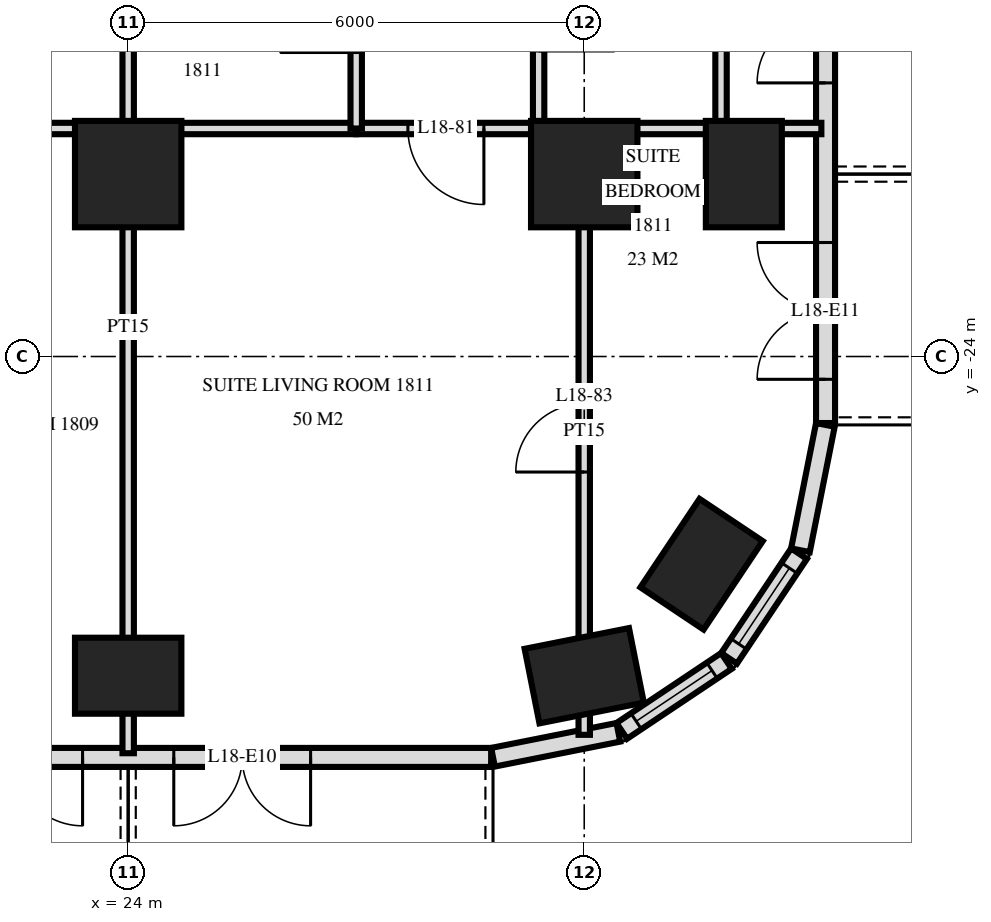
"""IFC4 building model, lengths in metres.
Left out: names, types, materials, properties, quantities, classifications, styles, units other than length and angle.
Written with IfcOpenShell. Run it as: python <this file> out.ifc"""

import sys

from ifc_helpers import new_model, si_unit, direction, frame, frame_2d, origin, origin_2d, place, context, subcontext, project, spatial, rectangle, extrude, element, fill, save


model = new_model("IFC4")
c1 = context("Model", 3, precision=1e-05, world=origin(), true_north=direction((0.0, 1.0)))
c2 = subcontext(c1, "Body", "Model", "MODEL_VIEW")
j1 = project(units=[si_unit("LENGTHUNIT", "METRE"), si_unit("PLANEANGLEUNIT", "RADIAN")], contexts=[c1])
p1 = place(None, origin())
s1 = spatial("IfcSite", under=j1, at=p1, CompositionType="ELEMENT")
p2 = place(p1, origin())
s2 = spatial("IfcBuilding", under=s1, at=p2, CompositionType="ELEMENT")
p3 = place(p2, frame((0.0, 0.0, 74.4)))
s3 = spatial("IfcBuildingStorey", under=s2, at=p3, CompositionType="ELEMENT", Elevation=74.4)
p4 = place(p3, frame((24.0, -28.2, 0.0), z_axis=(0.0, 0.0, 1.0), x_axis=(1.0, 0.0, 0.0)))
e1 = element("IfcColumn", 1, at=p4, inside=s3, PredefinedType="COLUMN", context=c2, shape_type="SweptSolid", body=[
    extrude(rectangle(XDim=1.4, YDim=1.0, at=origin_2d()), origin(), (0.0, 0.0, 1.0), 3.6),
])
p5 = place(p3, frame((24.0, -21.6, 0.0), z_axis=(0.0, 0.0, 1.0), x_axis=(1.0, 0.0, 0.0)))
e2 = element("IfcColumn", 2, at=p5, inside=s3, PredefinedType="COLUMN", context=c2, shape_type="SweptSolid", body=[
    extrude(rectangle(XDim=1.4, YDim=1.4, at=origin_2d()), origin(), (0.0, 0.0, 1.0), 3.6),
])
p6 = place(p3, frame((30.0, -28.2, 0.0), z_axis=(0.0, 0.0, 1.0), x_axis=(0.980792089743, 0.195056086032, 0.0)))
e3 = element("IfcColumn", 3, at=p6, inside=s3, PredefinedType="COLUMN", context=c2, shape_type="SweptSolid", body=[
    extrude(rectangle(XDim=1.4, YDim=1.0, at=origin_2d()), origin(), (0.0, 0.0, 1.0), 3.6),
])
p7 = place(p3, frame((30.0, -21.6, 0.0), z_axis=(0.0, 0.0, 1.0), x_axis=(1.0, 0.0, 0.0)))
e4 = element("IfcColumn", 4, at=p7, inside=s3, PredefinedType="COLUMN", context=c2, shape_type="SweptSolid", body=[
    extrude(rectangle(XDim=1.4, YDim=1.4, at=origin_2d()), origin(), (0.0, 0.0, 1.0), 3.6),
])
for number, where, z_axis, x_axis in (
    (5, (31.544, -26.733, 0.0), (0.0, 0.0, 1.0), (0.556, 0.831, 0.0)),
    (6, (32.1, -21.6, 0.0), (0.0, 0.0, 1.0), (0.0, 1.0, 0.0)),
):
    element("IfcColumn", number, at=place(p3, frame(where, z_axis=z_axis, x_axis=x_axis)), inside=s3, PredefinedType="COLUMN", context=c2, shape_type="SweptSolid", body=[
        extrude(rectangle(XDim=1.4, YDim=1.0, at=origin_2d()), origin(), (0.0, 0.0, 1.0), 3.6),
    ])
p8 = place(p3, frame((-28.775, -29.275, 0.0), z_axis=(0.0, 0.0, 1.0), x_axis=(1.0, 0.0, 0.0)))
e7 = element("IfcWall", 7, at=p8, inside=s3, PredefinedType="SOLIDWALL", context=c2, shape_type="SweptSolid", body=[
    extrude(rectangle(XDim=57.551, YDim=0.25, at=frame_2d((28.775, 0.0))), origin(), (0.0, 0.0, 1.0), 3.32),
])
p9 = place(p8, frame((0.575, 0.0, 0.0)))
e8 = element("IfcOpeningElement", 8, at=p9, cuts=e7, PredefinedType="OPENING", context=c2, shape_type="SweptSolid", body=[
    extrude(rectangle(XDim=1.8, YDim=2.4, at=frame_2d((0.9, 1.2))), frame((0.0, 0.135, 0.0), z_axis=(0.0, -1.0, 0.0), x_axis=(1.0, 0.0, 0.0)), (0.0, 0.0, 1.0), 0.27),
])
p10 = place(p8, frame((5.075, 0.0, 0.3)))
e9 = element("IfcOpeningElement", 9, at=p10, cuts=e7, PredefinedType="OPENING", context=c2, shape_type="SweptSolid", body=[
    extrude(rectangle(XDim=2.4, YDim=2.1, at=frame_2d((1.2, 1.05))), frame((0.0, 0.135, 0.0), z_axis=(0.0, -1.0, 0.0), x_axis=(1.0, 0.0, 0.0)), (0.0, 0.0, 1.0), 0.27),
])
p11 = place(p8, frame((8.375, 0.0, 0.0)))
e10 = element("IfcOpeningElement", 10, at=p11, cuts=e7, PredefinedType="OPENING", context=c2, shape_type="SweptSolid", body=[
    extrude(rectangle(XDim=1.8, YDim=2.4, at=frame_2d((0.9, 1.2))), frame((0.0, 0.135, 0.0), z_axis=(0.0, -1.0, 0.0), x_axis=(1.0, 0.0, 0.0)), (0.0, 0.0, 1.0), 0.27),
])
p12 = place(p8, frame((11.375, 0.0, 0.0)))
e11 = element("IfcOpeningElement", 11, at=p12, cuts=e7, PredefinedType="OPENING", context=c2, shape_type="SweptSolid", body=[
    extrude(rectangle(XDim=1.8, YDim=2.4, at=frame_2d((0.9, 1.2))), frame((0.0, 0.135, 0.0), z_axis=(0.0, -1.0, 0.0), x_axis=(1.0, 0.0, 0.0)), (0.0, 0.0, 1.0), 0.27),
])
p13 = place(p8, frame((14.075, 0.0, 0.3)))
e12 = element("IfcOpeningElement", 12, at=p13, cuts=e7, PredefinedType="OPENING", context=c2, shape_type="SweptSolid", body=[
    extrude(rectangle(XDim=2.4, YDim=2.1, at=frame_2d((1.2, 1.05))), frame((0.0, 0.135, 0.0), z_axis=(0.0, -1.0, 0.0), x_axis=(1.0, 0.0, 0.0)), (0.0, 0.0, 1.0), 0.27),
])
p14 = place(p8, frame((17.375, 0.0, 0.0)))
e13 = element("IfcOpeningElement", 13, at=p14, cuts=e7, PredefinedType="OPENING", context=c2, shape_type="SweptSolid", body=[
    extrude(rectangle(XDim=1.8, YDim=2.4, at=frame_2d((0.9, 1.2))), frame((0.0, 0.135, 0.0), z_axis=(0.0, -1.0, 0.0), x_axis=(1.0, 0.0, 0.0)), (0.0, 0.0, 1.0), 0.27),
])
p15 = place(p8, frame((20.075, 0.0, 0.3)))
e14 = element("IfcOpeningElement", 14, at=p15, cuts=e7, PredefinedType="OPENING", context=c2, shape_type="SweptSolid", body=[
    extrude(rectangle(XDim=2.4, YDim=2.1, at=frame_2d((1.2, 1.05))), frame((0.0, 0.135, 0.0), z_axis=(0.0, -1.0, 0.0), x_axis=(1.0, 0.0, 0.0)), (0.0, 0.0, 1.0), 0.27),
])
p16 = place(p8, frame((23.075, 0.0, 0.3)))
e15 = element("IfcOpeningElement", 15, at=p16, cuts=e7, PredefinedType="OPENING", context=c2, shape_type="SweptSolid", body=[
    extrude(rectangle(XDim=2.4, YDim=2.1, at=frame_2d((1.2, 1.05))), frame((0.0, 0.135, 0.0), z_axis=(0.0, -1.0, 0.0), x_axis=(1.0, 0.0, 0.0)), (0.0, 0.0, 1.0), 0.27),
])
p17 = place(p8, frame((26.375, 0.0, 0.0)))
e16 = element("IfcOpeningElement", 16, at=p17, cuts=e7, PredefinedType="OPENING", context=c2, shape_type="SweptSolid", body=[
    extrude(rectangle(XDim=1.8, YDim=2.4, at=frame_2d((0.9, 1.2))), frame((0.0, 0.135, 0.0), z_axis=(0.0, -1.0, 0.0), x_axis=(1.0, 0.0, 0.0)), (0.0, 0.0, 1.0), 0.27),
])
p18 = place(p8, frame((29.375, 0.0, 0.0)))
e17 = element("IfcOpeningElement", 17, at=p18, cuts=e7, PredefinedType="OPENING", context=c2, shape_type="SweptSolid", body=[
    extrude(rectangle(XDim=1.8, YDim=2.4, at=frame_2d((0.9, 1.2))), frame((0.0, 0.135, 0.0), z_axis=(0.0, -1.0, 0.0), x_axis=(1.0, 0.0, 0.0)), (0.0, 0.0, 1.0), 0.27),
])
p19 = place(p8, frame((32.075, 0.0, 0.3)))
e18 = element("IfcOpeningElement", 18, at=p19, cuts=e7, PredefinedType="OPENING", context=c2, shape_type="SweptSolid", body=[
    extrude(rectangle(XDim=2.4, YDim=2.1, at=frame_2d((1.2, 1.05))), frame((0.0, 0.135, 0.0), z_axis=(0.0, -1.0, 0.0), x_axis=(1.0, 0.0, 0.0)), (0.0, 0.0, 1.0), 0.27),
])
p20 = place(p8, frame((35.375, 0.0, 0.0)))
e19 = element("IfcOpeningElement", 19, at=p20, cuts=e7, PredefinedType="OPENING", context=c2, shape_type="SweptSolid", body=[
    extrude(rectangle(XDim=1.8, YDim=2.4, at=frame_2d((0.9, 1.2))), frame((0.0, 0.135, 0.0), z_axis=(0.0, -1.0, 0.0), x_axis=(1.0, 0.0, 0.0)), (0.0, 0.0, 1.0), 0.27),
])
p21 = place(p8, frame((38.075, 0.0, 0.3)))
e20 = element("IfcOpeningElement", 20, at=p21, cuts=e7, PredefinedType="OPENING", context=c2, shape_type="SweptSolid", body=[
    extrude(rectangle(XDim=2.4, YDim=2.1, at=frame_2d((1.2, 1.05))), frame((0.0, 0.135, 0.0), z_axis=(0.0, -1.0, 0.0), x_axis=(1.0, 0.0, 0.0)), (0.0, 0.0, 1.0), 0.27),
])
p22 = place(p8, frame((41.075, 0.0, 0.3)))
e21 = element("IfcOpeningElement", 21, at=p22, cuts=e7, PredefinedType="OPENING", context=c2, shape_type="SweptSolid", body=[
    extrude(rectangle(XDim=2.4, YDim=2.1, at=frame_2d((1.2, 1.05))), frame((0.0, 0.135, 0.0), z_axis=(0.0, -1.0, 0.0), x_axis=(1.0, 0.0, 0.0)), (0.0, 0.0, 1.0), 0.27),
])
p23 = place(p8, frame((44.375, 0.0, 0.0)))
e22 = element("IfcOpeningElement", 22, at=p23, cuts=e7, PredefinedType="OPENING", context=c2, shape_type="SweptSolid", body=[
    extrude(rectangle(XDim=1.8, YDim=2.4, at=frame_2d((0.9, 1.2))), frame((0.0, 0.135, 0.0), z_axis=(0.0, -1.0, 0.0), x_axis=(1.0, 0.0, 0.0)), (0.0, 0.0, 1.0), 0.27),
])
p24 = place(p8, frame((47.075, 0.0, 0.3)))
e23 = element("IfcOpeningElement", 23, at=p24, cuts=e7, PredefinedType="OPENING", context=c2, shape_type="SweptSolid", body=[
    extrude(rectangle(XDim=2.4, YDim=2.1, at=frame_2d((1.2, 1.05))), frame((0.0, 0.135, 0.0), z_axis=(0.0, -1.0, 0.0), x_axis=(1.0, 0.0, 0.0)), (0.0, 0.0, 1.0), 0.27),
])
p25 = place(p8, frame((50.375, 0.0, 0.0)))
e24 = element("IfcOpeningElement", 24, at=p25, cuts=e7, PredefinedType="OPENING", context=c2, shape_type="SweptSolid", body=[
    extrude(rectangle(XDim=1.8, YDim=2.4, at=frame_2d((0.9, 1.2))), frame((0.0, 0.135, 0.0), z_axis=(0.0, -1.0, 0.0), x_axis=(1.0, 0.0, 0.0)), (0.0, 0.0, 1.0), 0.27),
])
p26 = place(p8, frame((53.375, 0.0, 0.0)))
e25 = element("IfcOpeningElement", 25, at=p26, cuts=e7, PredefinedType="OPENING", context=c2, shape_type="SweptSolid", body=[
    extrude(rectangle(XDim=1.8, YDim=2.4, at=frame_2d((0.9, 1.2))), frame((0.0, 0.135, 0.0), z_axis=(0.0, -1.0, 0.0), x_axis=(1.0, 0.0, 0.0)), (0.0, 0.0, 1.0), 0.27),
])
p27 = place(p3, frame((28.8, -29.273, 0.0), z_axis=(0.0, 0.0, 1.0), x_axis=(0.980775640221, 0.19513878023, 0.0)))
e26 = element("IfcWall", 26, at=p27, inside=s3, PredefinedType="SOLIDWALL", context=c2, shape_type="SweptSolid", body=[
    extrude(rectangle(XDim=1.681, YDim=0.25, at=frame_2d((0.841, 0.0))), origin(), (0.0, 0.0, 1.0), 3.32),
])
p28 = place(p3, frame((30.494, -28.926, 0.0), z_axis=(0.0, 0.0, 1.0), x_axis=(0.831482937015, 0.55555029066, 0.0)))
e27 = element("IfcWall", 27, at=p28, inside=s3, PredefinedType="SOLIDWALL", context=c2, shape_type="SweptSolid", body=[
    extrude(rectangle(XDim=1.656, YDim=0.25, at=frame_2d((0.828, 0.0))), origin(), (0.0, 0.0, 1.0), 3.32),
])
p29 = place(p28, frame((0.228, 0.0, 0.9)))
e28 = element("IfcOpeningElement", 28, at=p29, cuts=e27, PredefinedType="OPENING", context=c2, shape_type="SweptSolid", body=[
    extrude(rectangle(XDim=1.2, YDim=1.5, at=frame_2d((0.6, 0.75))), frame((0.0, 0.135, 0.0), z_axis=(0.0, -1.0, 0.0), x_axis=(1.0, 0.0, 0.0)), (0.0, 0.0, 1.0), 0.27),
])
p30 = place(p3, frame((31.906, -27.971, 0.0), z_axis=(0.0, 0.0, 1.0), x_axis=(0.55555029066, 0.831482937015, 0.0)))
e29 = element("IfcWall", 29, at=p30, inside=s3, PredefinedType="SOLIDWALL", context=c2, shape_type="SweptSolid", body=[
    extrude(rectangle(XDim=1.656, YDim=0.25, at=frame_2d((0.828, 0.0))), origin(), (0.0, 0.0, 1.0), 3.32),
])
p31 = place(p30, frame((0.228, 0.0, 0.9)))
e30 = element("IfcOpeningElement", 30, at=p31, cuts=e29, PredefinedType="OPENING", context=c2, shape_type="SweptSolid", body=[
    extrude(rectangle(XDim=1.2, YDim=1.5, at=frame_2d((0.6, 0.75))), frame((0.0, 0.135, 0.0), z_axis=(0.0, -1.0, 0.0), x_axis=(1.0, 0.0, 0.0)), (0.0, 0.0, 1.0), 0.27),
])
p32 = place(p3, frame((32.844, -26.549, 0.0), z_axis=(0.0, 0.0, 1.0), x_axis=(0.195166572128, 0.980770110232, 0.0)))
e31 = element("IfcWall", 31, at=p32, inside=s3, PredefinedType="SOLIDWALL", context=c2, shape_type="SweptSolid", body=[
    extrude(rectangle(XDim=1.681, YDim=0.25, at=frame_2d((0.841, 0.0))), origin(), (0.0, 0.0, 1.0), 3.32),
])
p33 = place(p3, frame((33.175, -24.875, 0.0), z_axis=(0.0, 0.0, 1.0), x_axis=(0.0, 1.0, 0.0)))
e32 = element("IfcWall", 32, at=p33, inside=s3, PredefinedType="SOLIDWALL", context=c2, shape_type="SweptSolid", body=[
    extrude(rectangle(XDim=21.551, YDim=0.25, at=frame_2d((10.775, 0.0))), origin(), (0.0, 0.0, 1.0), 3.32),
])
p34 = place(p33, frame((0.575, 0.0, 0.0)))
e33 = element("IfcOpeningElement", 33, at=p34, cuts=e32, PredefinedType="OPENING", context=c2, shape_type="SweptSolid", body=[
    extrude(rectangle(XDim=1.8, YDim=2.4, at=frame_2d((0.9, 1.2))), frame((0.0, 0.135, 0.0), z_axis=(0.0, -1.0, 0.0), x_axis=(1.0, 0.0, 0.0)), (0.0, 0.0, 1.0), 0.27),
])
p35 = place(p33, frame((4.475, 0.0, 0.0)))
e34 = element("IfcOpeningElement", 34, at=p35, cuts=e32, PredefinedType="OPENING", context=c2, shape_type="SweptSolid", body=[
    extrude(rectangle(XDim=1.8, YDim=2.4, at=frame_2d((0.9, 1.2))), frame((0.0, 0.135, 0.0), z_axis=(0.0, -1.0, 0.0), x_axis=(1.0, 0.0, 0.0)), (0.0, 0.0, 1.0), 0.27),
])
p36 = place(p33, frame((7.775, 0.0, 0.3)))
e35 = element("IfcOpeningElement", 35, at=p36, cuts=e32, PredefinedType="OPENING", context=c2, shape_type="SweptSolid", body=[
    extrude(rectangle(XDim=1.2, YDim=2.1, at=frame_2d((0.6, 1.05))), frame((0.0, 0.135, 0.0), z_axis=(0.0, -1.0, 0.0), x_axis=(1.0, 0.0, 0.0)), (0.0, 0.0, 1.0), 0.27),
])
p37 = place(p33, frame((13.1, 0.0, 0.0)))
e36 = element("IfcOpeningElement", 36, at=p37, cuts=e32, PredefinedType="OPENING", context=c2, shape_type="SweptSolid", body=[
    extrude(rectangle(XDim=1.8, YDim=2.4, at=frame_2d((0.9, 1.2))), frame((0.0, 0.135, 0.0), z_axis=(0.0, -1.0, 0.0), x_axis=(1.0, 0.0, 0.0)), (0.0, 0.0, 1.0), 0.27),
])
p38 = place(p3, frame((31.8, -21.0, 0.0), z_axis=(0.0, 0.0, 1.0), x_axis=(0.0, 1.0, 0.0)))
e37 = element("IfcWall", 37, at=p38, inside=s3, PredefinedType="PLUMBINGWALL", context=c2, shape_type="SweptSolid", body=[
    extrude(rectangle(XDim=3.0, YDim=0.15, at=frame_2d((1.5, 0.0))), origin(), (0.0, 0.0, 1.0), 3.32),
])
p39 = place(p38, frame((1.12, 0.0, 0.0)))
e38 = element("IfcOpeningElement", 38, at=p39, cuts=e37, PredefinedType="OPENING", context=c2, shape_type="SweptSolid", body=[
    extrude(rectangle(XDim=0.8, YDim=2.1, at=frame_2d((0.4, 1.05))), frame((0.0, 0.085, 0.0), z_axis=(0.0, -1.0, 0.0), x_axis=(1.0, 0.0, 0.0)), (0.0, 0.0, 1.0), 0.17),
])
p40 = place(p3, frame((30.0, -28.978, 0.0), z_axis=(0.0, 0.0, 1.0), x_axis=(0.0, 1.0, 0.0)))
e39 = element("IfcWall", 39, at=p40, inside=s3, PredefinedType="PARTITIONING", context=c2, shape_type="SweptSolid", body=[
    extrude(rectangle(XDim=7.978, YDim=0.15, at=frame_2d((3.989, 0.0))), origin(), (0.0, 0.0, 1.0), 3.32),
])
p41 = place(p40, frame((3.458, 0.0, 0.0)))
e40 = element("IfcOpeningElement", 40, at=p41, cuts=e39, PredefinedType="OPENING", context=c2, shape_type="SweptSolid", body=[
    extrude(rectangle(XDim=0.9, YDim=2.1, at=frame_2d((0.45, 1.05))), frame((0.0, 0.085, 0.0), z_axis=(0.0, -1.0, 0.0), x_axis=(1.0, 0.0, 0.0)), (0.0, 0.0, 1.0), 0.17),
])
p42 = place(p3, frame((29.4, -21.0, 0.0), z_axis=(0.0, 0.0, 1.0), x_axis=(0.0, 1.0, 0.0)))
e41 = element("IfcWall", 41, at=p42, inside=s3, PredefinedType="PARTITIONING", context=c2, shape_type="SweptSolid", body=[
    extrude(rectangle(XDim=3.0, YDim=0.15, at=frame_2d((1.5, 0.0))), origin(), (0.0, 0.0, 1.0), 3.32),
])
p43 = place(p42, frame((1.02, 0.0, 0.0)))
e42 = element("IfcOpeningElement", 42, at=p43, cuts=e41, PredefinedType="OPENING", context=c2, shape_type="SweptSolid", body=[
    extrude(rectangle(XDim=1.0, YDim=2.1, at=frame_2d((0.5, 1.05))), frame((0.0, 0.085, 0.0), z_axis=(0.0, -1.0, 0.0), x_axis=(1.0, 0.0, 0.0)), (0.0, 0.0, 1.0), 0.17),
])
p44 = place(p3, frame((27.0, -21.0, 0.0), z_axis=(0.0, 0.0, 1.0), x_axis=(0.0, 1.0, 0.0)))
e43 = element("IfcWall", 43, at=p44, inside=s3, PredefinedType="PARTITIONING", context=c2, shape_type="SweptSolid", body=[
    extrude(rectangle(XDim=3.0, YDim=0.15, at=frame_2d((1.5, 0.0))), origin(), (0.0, 0.0, 1.0), 3.32),
])
p45 = place(p44, frame((1.0, 0.0, 0.0)))
e44 = element("IfcOpeningElement", 44, at=p45, cuts=e43, PredefinedType="OPENING", context=c2, shape_type="SweptSolid", body=[
    extrude(rectangle(XDim=1.0, YDim=2.1, at=frame_2d((0.5, 1.05))), frame((0.0, 0.085, 0.0), z_axis=(0.0, -1.0, 0.0), x_axis=(1.0, 0.0, 0.0)), (0.0, 0.0, 1.0), 0.17),
])
p46 = place(p3, frame((24.0, -29.22, 0.0), z_axis=(0.0, 0.0, 1.0), x_axis=(0.0, 1.0, 0.0)))
e45 = element("IfcWall", 45, at=p46, inside=s3, PredefinedType="PARTITIONING", context=c2, shape_type="SweptSolid", body=[
    extrude(rectangle(XDim=11.22, YDim=0.15, at=frame_2d((5.61, 0.0))), origin(), (0.0, 0.0, 1.0), 3.32),
])
p47 = place(p3, frame((27.0, -21.0, 0.0), z_axis=(0.0, 0.0, 1.0), x_axis=(1.0, 0.0, 0.0)))
e46 = element("IfcWall", 46, at=p47, inside=s3, PredefinedType="PARTITIONING", context=c2, shape_type="SweptSolid", body=[
    extrude(rectangle(XDim=2.4, YDim=0.15, at=frame_2d((1.2, 0.0))), origin(), (0.0, 0.0, 1.0), 3.32),
])
p48 = place(p47, frame((0.68, 0.0, 0.0)))
e47 = element("IfcOpeningElement", 47, at=p48, cuts=e46, PredefinedType="OPENING", context=c2, shape_type="SweptSolid", body=[
    extrude(rectangle(XDim=1.0, YDim=2.1, at=frame_2d((0.5, 1.05))), frame((0.0, 0.085, 0.0), z_axis=(0.0, -1.0, 0.0), x_axis=(1.0, 0.0, 0.0)), (0.0, 0.0, 1.0), 0.17),
])
p49 = place(p3, frame((22.3, -21.0, 0.0), z_axis=(0.0, 0.0, 1.0), x_axis=(1.0, 0.0, 0.0)))
e48 = element("IfcWall", 48, at=p49, inside=s3, PredefinedType="PARTITIONING", context=c2, shape_type="SweptSolid", body=[
    extrude(rectangle(XDim=4.7, YDim=0.15, at=frame_2d((2.35, 0.0))), origin(), (0.0, 0.0, 1.0), 3.32),
])
p50 = place(p3, frame((29.4, -21.0, 0.0), z_axis=(0.0, 0.0, 1.0), x_axis=(1.0, 0.0, 0.0)))
e49 = element("IfcWall", 49, at=p50, inside=s3, PredefinedType="PARTITIONING", context=c2, shape_type="SweptSolid", body=[
    extrude(rectangle(XDim=2.4, YDim=0.15, at=frame_2d((1.2, 0.0))), origin(), (0.0, 0.0, 1.0), 3.32),
])
p51 = place(p3, frame((31.8, -21.0, 0.0), z_axis=(0.0, 0.0, 1.0), x_axis=(1.0, 0.0, 0.0)))
e50 = element("IfcWall", 50, at=p51, inside=s3, PredefinedType="PLUMBINGWALL", context=c2, shape_type="SweptSolid", body=[
    extrude(rectangle(XDim=1.32, YDim=0.15, at=frame_2d((0.66, 0.0))), origin(), (0.0, 0.0, 1.0), 3.32),
])
p52 = place(p29, origin())
e51 = element("IfcWindow", 51, at=p52, inside=s3, PartitioningType="SINGLE_PANEL", PredefinedType="WINDOW", context=c2, shape_type="SweptSolid", body=[
    extrude(rectangle(XDim=1.2, YDim=1.5, at=frame_2d((0.6, 0.75))), frame((0.0, 0.03, 0.0), z_axis=(0.0, -1.0, 0.0), x_axis=(1.0, 0.0, 0.0)), (0.0, 0.0, 1.0), 0.06),
])
fill(e28, e51)
p53 = place(p31, origin())
e52 = element("IfcWindow", 52, at=p53, inside=s3, PartitioningType="SINGLE_PANEL", PredefinedType="WINDOW", context=c2, shape_type="SweptSolid", body=[
    extrude(rectangle(XDim=1.2, YDim=1.5, at=frame_2d((0.6, 0.75))), frame((0.0, 0.03, 0.0), z_axis=(0.0, -1.0, 0.0), x_axis=(1.0, 0.0, 0.0)), (0.0, 0.0, 1.0), 0.06),
])
fill(e30, e52)
p54 = place(p25, frame((0.9, 0.0, 0.0), z_axis=(0.0, 0.0, 1.0), x_axis=(-1.0, 0.0, 0.0)))
e53 = element("IfcDoor", 53, at=p54, inside=s3, OperationType="DOUBLE_DOOR_SINGLE_SWING", PredefinedType="DOOR", context=c2, shape_type="SweptSolid", body=[
    extrude(rectangle(XDim=1.8, YDim=2.4, at=frame_2d((0.0, 1.2))), frame((0.0, -0.025, 0.0), z_axis=(0.0, 1.0, 0.0), x_axis=(-1.0, 0.0, 0.0)), (0.0, 0.0, 1.0), 0.05),
])
fill(e24, e53)
p55 = place(p26, frame((0.9, 0.0, 0.0), z_axis=(0.0, 0.0, 1.0), x_axis=(-1.0, 0.0, 0.0)))
e54 = element("IfcDoor", 54, at=p55, inside=s3, OperationType="DOUBLE_DOOR_SINGLE_SWING", PredefinedType="DOOR", context=c2, shape_type="SweptSolid", body=[
    extrude(rectangle(XDim=1.8, YDim=2.4, at=frame_2d((0.0, 1.2))), frame((0.0, -0.025, 0.0), z_axis=(0.0, 1.0, 0.0), x_axis=(-1.0, 0.0, 0.0)), (0.0, 0.0, 1.0), 0.05),
])
fill(e25, e54)
p56 = place(p34, origin())
e55 = element("IfcDoor", 55, at=p56, inside=s3, OperationType="DOUBLE_DOOR_SINGLE_SWING", PredefinedType="DOOR", context=c2, shape_type="SweptSolid", body=[
    extrude(rectangle(XDim=1.8, YDim=2.4, at=frame_2d((0.9, 1.2))), frame((0.0, 0.025, 0.0), z_axis=(0.0, -1.0, 0.0), x_axis=(1.0, 0.0, 0.0)), (0.0, 0.0, 1.0), 0.05),
])
fill(e33, e55)
p57 = place(p35, origin())
e56 = element("IfcDoor", 56, at=p57, inside=s3, OperationType="DOUBLE_DOOR_SINGLE_SWING", PredefinedType="DOOR", context=c2, shape_type="SweptSolid", body=[
    extrude(rectangle(XDim=1.8, YDim=2.4, at=frame_2d((0.9, 1.2))), frame((0.0, 0.025, 0.0), z_axis=(0.0, -1.0, 0.0), x_axis=(1.0, 0.0, 0.0)), (0.0, 0.0, 1.0), 0.05),
])
fill(e34, e56)
p58 = place(p48, frame((0.5, 0.0, 0.0), z_axis=(0.0, 0.0, 1.0), x_axis=(-1.0, 0.0, 0.0)))
e57 = element("IfcDoor", 57, at=p58, inside=s3, OperationType="SINGLE_SWING_RIGHT", PredefinedType="DOOR", context=c2, shape_type="SweptSolid", body=[
    extrude(rectangle(XDim=1.0, YDim=2.1, at=frame_2d((0.0, 1.05))), frame((0.0, -0.025, 0.0), z_axis=(0.0, 1.0, 0.0), x_axis=(-1.0, 0.0, 0.0)), (0.0, 0.0, 1.0), 0.05),
])
fill(e47, e57)
p59 = place(p41, origin())
e58 = element("IfcDoor", 58, at=p59, inside=s3, OperationType="SINGLE_SWING_RIGHT", PredefinedType="DOOR", context=c2, shape_type="SweptSolid", body=[
    extrude(rectangle(XDim=0.9, YDim=2.1, at=frame_2d((0.45, 1.05))), frame((0.0, 0.025, 0.0), z_axis=(0.0, -1.0, 0.0), x_axis=(1.0, 0.0, 0.0)), (0.0, 0.0, 1.0), 0.05),
])
fill(e40, e58)
save(model, sys.argv[1])
